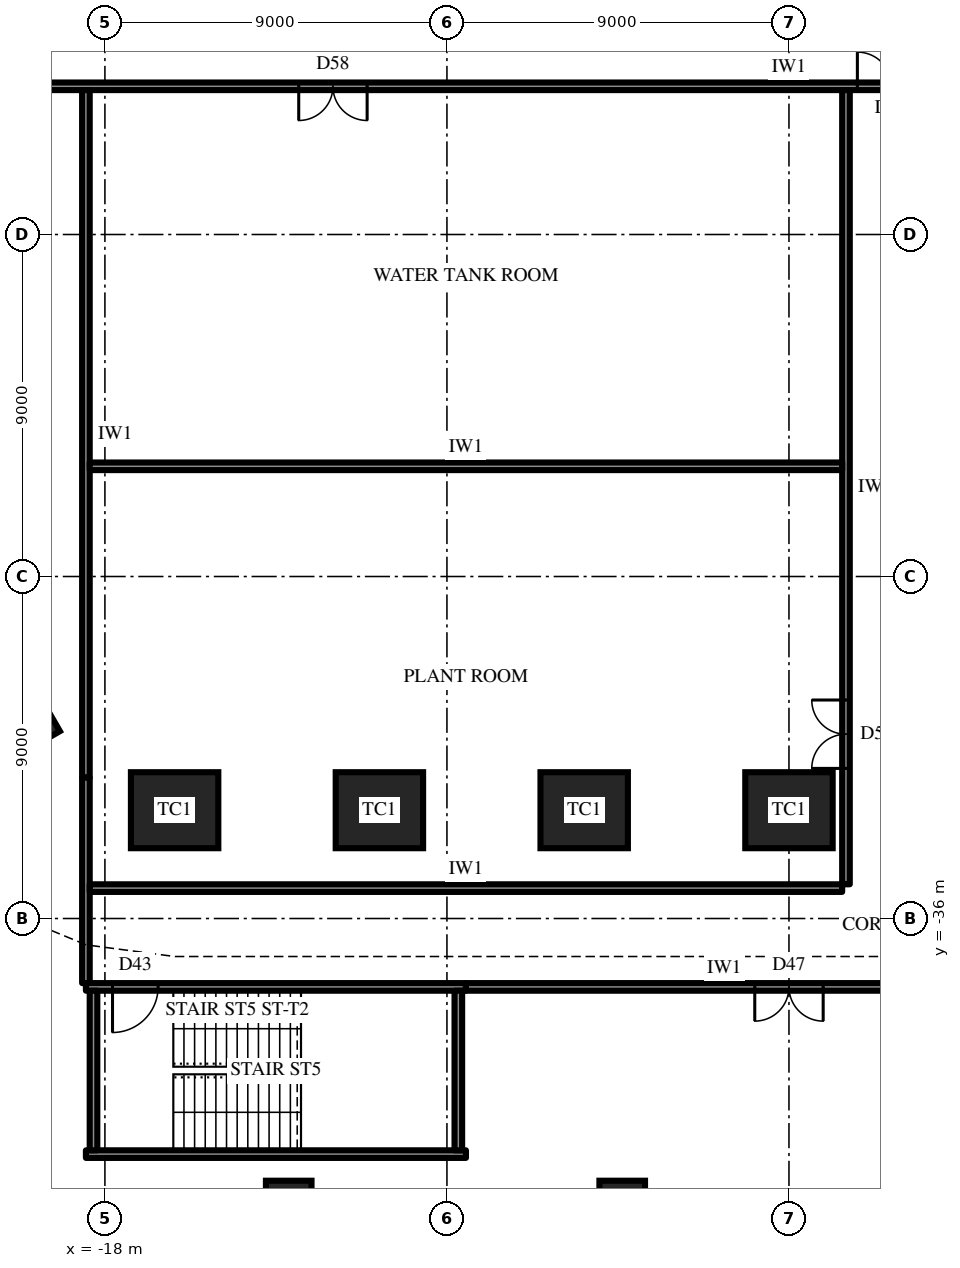
"""IFC4 building model, lengths in metres.
Left out: names, types, materials, properties, quantities, classifications, styles, units other than length and angle.
Written with IfcOpenShell. Run it as: python <this file> out.ifc"""

import sys

from ifc_helpers import new_model, si_unit, direction, frame, frame_2d, origin, origin_2d, place, context, subcontext, project, spatial, rectangle, extrude, element, fill, save


model = new_model("IFC4")
c1 = context("Model", 3, precision=1e-05, world=origin(), true_north=direction((0.0, 1.0)))
c2 = subcontext(c1, "Body", "Model", "MODEL_VIEW")
j1 = project(units=[si_unit("LENGTHUNIT", "METRE"), si_unit("PLANEANGLEUNIT", "RADIAN")], contexts=[c1])
p1 = place(None, origin())
s1 = spatial("IfcSite", under=j1, at=p1, CompositionType="ELEMENT")
p2 = place(p1, origin())
s2 = spatial("IfcBuilding", under=s1, at=p2, CompositionType="ELEMENT")
p3 = place(p2, frame((0.0, 0.0, -9.0)))
s3 = spatial("IfcBuildingStorey", under=s2, at=p3, CompositionType="ELEMENT", Elevation=-9.0)
for number, where, z_axis, x_axis in (
    (1, (-20.626, -30.575, 0.0), (0.0, 0.0, 1.0), (0.5, -0.866, 0.0)),
    (2, (-16.166, -33.15, 0.0), (0.0, 0.0, 1.0), (1.0, 0.0, 0.0)),
    (3, (-10.777, -33.15, 0.0), (0.0, 0.0, 1.0), (1.0, 0.0, 0.0)),
    (4, (-5.389, -33.15, 0.0), (0.0, 0.0, 1.0), (1.0, 0.0, 0.0)),
    (5, (0.0, -33.15, 0.0), (0.0, 0.0, 1.0), (1.0, 0.0, 0.0)),
):
    element("IfcColumn", number, at=place(p3, frame(where, z_axis=z_axis, x_axis=x_axis)), inside=s3, PredefinedType="COLUMN", context=c2, shape_type="SweptSolid", body=[
        extrude(rectangle(XDim=2.3, YDim=2.0, at=origin_2d()), origin(), (0.0, 0.0, 1.0), 4.5),
    ])
p4 = place(p3, frame((-18.5, -42.2, 0.0), z_axis=(0.0, 0.0, 1.0), x_axis=(1.0, 0.0, 0.0)))
e6 = element("IfcWall", 6, at=p4, inside=s3, PredefinedType="SHEAR", context=c2, shape_type="SweptSolid", body=[
    extrude(rectangle(XDim=10.0, YDim=0.2, at=frame_2d((5.0, 0.0))), origin(), (0.0, 0.0, 1.0), 4.5),
])
p5 = place(p3, frame((-8.5, -37.8, 0.0), z_axis=(0.0, 0.0, 1.0), x_axis=(-1.0, 0.0, 0.0)))
e7 = element("IfcWall", 7, at=p5, inside=s3, PredefinedType="SHEAR", context=c2, shape_type="SweptSolid", body=[
    extrude(rectangle(XDim=10.0, YDim=0.2, at=frame_2d((5.0, 0.0))), origin(), (0.0, 0.0, 1.0), 4.5),
])
p6 = place(p5, frame((8.1, 0.0, 0.0)))
e8 = element("IfcOpeningElement", 8, at=p6, cuts=e7, PredefinedType="OPENING", context=c2, shape_type="SweptSolid", body=[
    extrude(rectangle(XDim=1.2, YDim=2.2, at=frame_2d((0.6, 1.1))), frame((0.0, 0.11, 0.0), z_axis=(0.0, -1.0, 0.0), x_axis=(1.0, 0.0, 0.0)), (0.0, 0.0, 1.0), 0.22),
])
for number, where, z_axis, x_axis in (
    (9, (-18.3, -37.9, 0.0), (0.0, 0.0, 1.0), (0.0, -1.0, 0.0)),
    (10, (-8.7, -42.1, 0.0), (0.0, 0.0, 1.0), (0.0, 1.0, 0.0)),
):
    element("IfcWall", number, at=place(p3, frame(where, z_axis=z_axis, x_axis=x_axis)), inside=s3, PredefinedType="SHEAR", context=c2, shape_type="SweptSolid", body=[
        extrude(rectangle(XDim=4.2, YDim=0.2, at=frame_2d((2.1, 0.0))), origin(), (0.0, 0.0, 1.0), 4.5),
    ])
for number, where, z_axis, x_axis in (
    (11, (-13.164, -43.5, 0.0), (0.0, 0.0, 1.0), (1.0, 0.0, 0.0)),
    (12, (-4.388, -43.5, 0.0), (0.0, 0.0, 1.0), (1.0, 0.0, 0.0)),
):
    element("IfcColumn", number, at=place(p3, frame(where, z_axis=z_axis, x_axis=x_axis)), inside=s3, PredefinedType="COLUMN", context=c2, shape_type="SweptSolid", body=[
        extrude(rectangle(XDim=1.2, YDim=1.2, at=origin_2d()), origin(), (0.0, 0.0, 1.0), 4.5),
    ])
p7 = place(p3, frame((-44.283, -14.1, 0.0), z_axis=(0.0, 0.0, 1.0), x_axis=(1.0, 0.0, 0.0)))
e13 = element("IfcWall", 13, at=p7, inside=s3, PredefinedType="PARTITIONING", context=c2, shape_type="SweptSolid", body=[
    extrude(rectangle(XDim=88.565, YDim=0.2, at=frame_2d((44.283, 0.0))), origin(), (0.0, 0.0, 1.0), 4.15),
])
p8 = place(p7, frame((31.383, 0.0, 0.0)))
e14 = element("IfcOpeningElement", 14, at=p8, cuts=e13, PredefinedType="OPENING", context=c2, shape_type="SweptSolid", body=[
    extrude(rectangle(XDim=1.8, YDim=2.4, at=frame_2d((0.9, 1.2))), frame((0.0, 0.11, 0.0), z_axis=(0.0, -1.0, 0.0), x_axis=(1.0, 0.0, 0.0)), (0.0, 0.0, 1.0), 0.22),
])
p9 = place(p7, frame((49.883, 0.0, 0.0)))
e15 = element("IfcOpeningElement", 15, at=p9, cuts=e13, PredefinedType="OPENING", context=c2, shape_type="SweptSolid", body=[
    extrude(rectangle(XDim=1.8, YDim=2.4, at=frame_2d((0.9, 1.2))), frame((0.0, 0.11, 0.0), z_axis=(0.0, -1.0, 0.0), x_axis=(1.0, 0.0, 0.0)), (0.0, 0.0, 1.0), 0.22),
])
p10 = place(p7, frame((46.083, 0.0, 0.0)))
e16 = element("IfcOpeningElement", 16, at=p10, cuts=e13, PredefinedType="OPENING", context=c2, shape_type="SweptSolid", body=[
    extrude(rectangle(XDim=1.8, YDim=2.4, at=frame_2d((0.9, 1.2))), frame((0.0, 0.11, 0.0), z_axis=(0.0, -1.0, 0.0), x_axis=(1.0, 0.0, 0.0)), (0.0, 0.0, 1.0), 0.22),
])
p11 = place(p7, frame((63.633, 0.0, 0.0)))
e17 = element("IfcOpeningElement", 17, at=p11, cuts=e13, PredefinedType="OPENING", context=c2, shape_type="SweptSolid", body=[
    extrude(rectangle(XDim=1.0, YDim=2.2, at=frame_2d((0.5, 1.1))), frame((0.0, 0.11, 0.0), z_axis=(0.0, -1.0, 0.0), x_axis=(1.0, 0.0, 0.0)), (0.0, 0.0, 1.0), 0.22),
])
p12 = place(p3, frame((-18.5, -14.2, 0.0), z_axis=(0.0, 0.0, 1.0), x_axis=(0.0, -1.0, 0.0)))
e18 = element("IfcWall", 18, at=p12, inside=s3, PredefinedType="PARTITIONING", context=c2, shape_type="SweptSolid", body=[
    extrude(rectangle(XDim=18.09, YDim=0.2, at=frame_2d((9.045, 0.0))), origin(), (0.0, 0.0, 1.0), 3.094),
])
p13 = place(p3, frame((-18.5, -32.29, 0.0), z_axis=(0.0, 0.0, 1.0), x_axis=(0.0, -1.0, 0.0)))
e19 = element("IfcWall", 19, at=p13, inside=s3, PredefinedType="PARTITIONING", context=c2, shape_type="SweptSolid", body=[
    extrude(rectangle(XDim=5.41, YDim=0.2, at=frame_2d((2.705, 0.0))), origin(), (0.0, 0.0, 1.0), 4.15),
])
p14 = place(p3, frame((1.5, -14.2, 0.0), z_axis=(0.0, 0.0, 1.0), x_axis=(0.0, -1.0, 0.0)))
e20 = element("IfcWall", 20, at=p14, inside=s3, PredefinedType="PARTITIONING", context=c2, shape_type="SweptSolid", body=[
    extrude(rectangle(XDim=20.9, YDim=0.2, at=frame_2d((10.45, 0.0))), origin(), (0.0, 0.0, 1.0), 4.15),
])
p15 = place(p14, frame((16.05, 0.0, 0.0)))
e21 = element("IfcOpeningElement", 21, at=p15, cuts=e20, PredefinedType="OPENING", context=c2, shape_type="SweptSolid", body=[
    extrude(rectangle(XDim=1.8, YDim=2.4, at=frame_2d((0.9, 1.2))), frame((0.0, 0.11, 0.0), z_axis=(0.0, -1.0, 0.0), x_axis=(1.0, 0.0, 0.0)), (0.0, 0.0, 1.0), 0.22),
])
for number, where, z_axis, x_axis in (
    (22, (-18.4, -24.1, 0.0), (0.0, 0.0, 1.0), (1.0, 0.0, 0.0)),
    (23, (-18.4, -35.2, 0.0), (0.0, 0.0, 1.0), (1.0, 0.0, 0.0)),
):
    element("IfcWall", number, at=place(p3, frame(where, z_axis=z_axis, x_axis=x_axis)), inside=s3, PredefinedType="PARTITIONING", context=c2, shape_type="SweptSolid", body=[
        extrude(rectangle(XDim=19.8, YDim=0.2, at=frame_2d((9.9, 0.0))), origin(), (0.0, 0.0, 1.0), 4.15),
    ])
p16 = place(p3, frame((-8.5, -37.8, 0.0), z_axis=(0.0, 0.0, 1.0), x_axis=(1.0, 0.0, 0.0)))
e24 = element("IfcWall", 24, at=p16, inside=s3, PredefinedType="PARTITIONING", context=c2, shape_type="SweptSolid", body=[
    extrude(rectangle(XDim=17.0, YDim=0.2, at=frame_2d((8.5, 0.0))), origin(), (0.0, 0.0, 1.0), 4.15),
])
p17 = place(p16, frame((7.6, 0.0, 0.0)))
e25 = element("IfcOpeningElement", 25, at=p17, cuts=e24, PredefinedType="OPENING", context=c2, shape_type="SweptSolid", body=[
    extrude(rectangle(XDim=1.8, YDim=2.4, at=frame_2d((0.9, 1.2))), frame((0.0, 0.11, 0.0), z_axis=(0.0, -1.0, 0.0), x_axis=(1.0, 0.0, 0.0)), (0.0, 0.0, 1.0), 0.22),
])
p18 = place(p8, frame((1.8, 0.0, 0.0), z_axis=(0.0, 0.0, 1.0), x_axis=(-1.0, 0.0, 0.0)))
e26 = element("IfcDoor", 26, at=p18, inside=s3, OperationType="DOUBLE_DOOR_SINGLE_SWING", PredefinedType="DOOR", context=c2, shape_type="SweptSolid", body=[
    extrude(rectangle(XDim=1.8, YDim=2.4, at=frame_2d((0.9, 1.2))), frame((0.0, 0.025, 0.0), z_axis=(0.0, -1.0, 0.0), x_axis=(1.0, 0.0, 0.0)), (0.0, 0.0, 1.0), 0.05),
])
fill(e14, e26)
p19 = place(p10, origin())
e27 = element("IfcDoor", 27, at=p19, inside=s3, OperationType="DOUBLE_DOOR_SINGLE_SWING", PredefinedType="DOOR", context=c2, shape_type="SweptSolid", body=[
    extrude(rectangle(XDim=1.8, YDim=2.4, at=frame_2d((0.9, 1.2))), frame((0.0, 0.025, 0.0), z_axis=(0.0, -1.0, 0.0), x_axis=(1.0, 0.0, 0.0)), (0.0, 0.0, 1.0), 0.05),
])
fill(e16, e27)
p20 = place(p15, frame((1.8, 0.0, 0.0), z_axis=(0.0, 0.0, 1.0), x_axis=(-1.0, 0.0, 0.0)))
e28 = element("IfcDoor", 28, at=p20, inside=s3, OperationType="DOUBLE_DOOR_SINGLE_SWING", PredefinedType="DOOR", context=c2, shape_type="SweptSolid", body=[
    extrude(rectangle(XDim=1.8, YDim=2.4, at=frame_2d((0.9, 1.2))), frame((0.0, 0.025, 0.0), z_axis=(0.0, -1.0, 0.0), x_axis=(1.0, 0.0, 0.0)), (0.0, 0.0, 1.0), 0.05),
])
fill(e21, e28)
p21 = place(p17, frame((1.8, 0.0, 0.0), z_axis=(0.0, 0.0, 1.0), x_axis=(-1.0, 0.0, 0.0)))
e29 = element("IfcDoor", 29, at=p21, inside=s3, OperationType="DOUBLE_DOOR_SINGLE_SWING", PredefinedType="DOOR", context=c2, shape_type="SweptSolid", body=[
    extrude(rectangle(XDim=1.8, YDim=2.4, at=frame_2d((0.9, 1.2))), frame((0.0, 0.025, 0.0), z_axis=(0.0, -1.0, 0.0), x_axis=(1.0, 0.0, 0.0)), (0.0, 0.0, 1.0), 0.05),
])
fill(e25, e29)
p22 = place(p6, origin())
e30 = element("IfcDoor", 30, at=p22, inside=s3, OperationType="SINGLE_SWING_LEFT", PredefinedType="DOOR", context=c2, shape_type="SweptSolid", body=[
    extrude(rectangle(XDim=1.2, YDim=2.2, at=frame_2d((0.6, 1.1))), frame((0.0, 0.025, 0.0), z_axis=(0.0, -1.0, 0.0), x_axis=(1.0, 0.0, 0.0)), (0.0, 0.0, 1.0), 0.05),
])
fill(e8, e30)
save(model, sys.argv[1])
